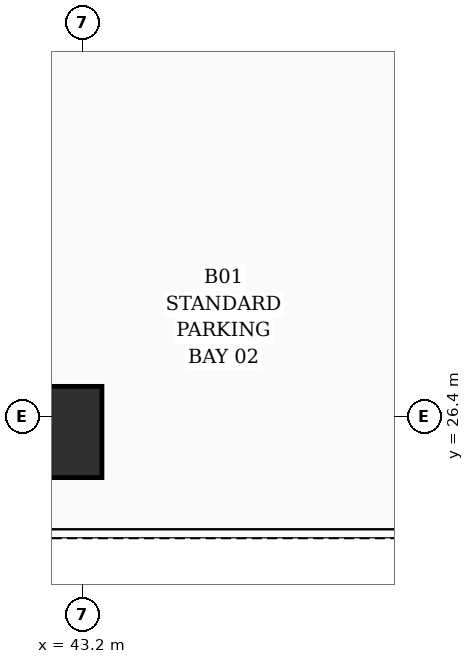
"""IFC4 building model, lengths in metres.
Left out: names, types, materials, properties, quantities, classifications, styles, units other than length and angle.
Written with IfcOpenShell. Run it as: python <this file> out.ifc"""

import sys

from ifc_helpers import new_model, si_unit, direction, frame, origin, origin_2d, place, context, subcontext, project, spatial, rectangle, extrude, element, save


model = new_model("IFC4")
c1 = context("Model", 3, precision=1e-05, world=origin(), true_north=direction((0.0, 1.0)))
c2 = subcontext(c1, "Body", "Model", "MODEL_VIEW")
j1 = project(units=[si_unit("LENGTHUNIT", "METRE"), si_unit("PLANEANGLEUNIT", "RADIAN")], contexts=[c1])
p1 = place(None, origin())
s1 = spatial("IfcSite", under=j1, at=p1, CompositionType="ELEMENT")
p2 = place(p1, origin())
s2 = spatial("IfcBuilding", under=s1, at=p2, CompositionType="ELEMENT")
p3 = place(p2, frame((0.0, 0.0, -4.5)))
s3 = spatial("IfcBuildingStorey", under=s2, at=p3, CompositionType="ELEMENT", Elevation=-4.5)
p4 = place(p3, frame((42.85, 26.2, 0.0), z_axis=(0.0, 0.0, 1.0), x_axis=(1.0, 0.0, 0.0)))
e1 = element("IfcColumn", 1, at=p4, inside=s3, PredefinedType="COLUMN", context=c2, shape_type="SweptSolid", body=[
    extrude(rectangle(XDim=1.2, YDim=1.2, at=origin_2d()), origin(), (0.0, 0.0, 1.0), 4.5),
])
save(model, sys.argv[1])
